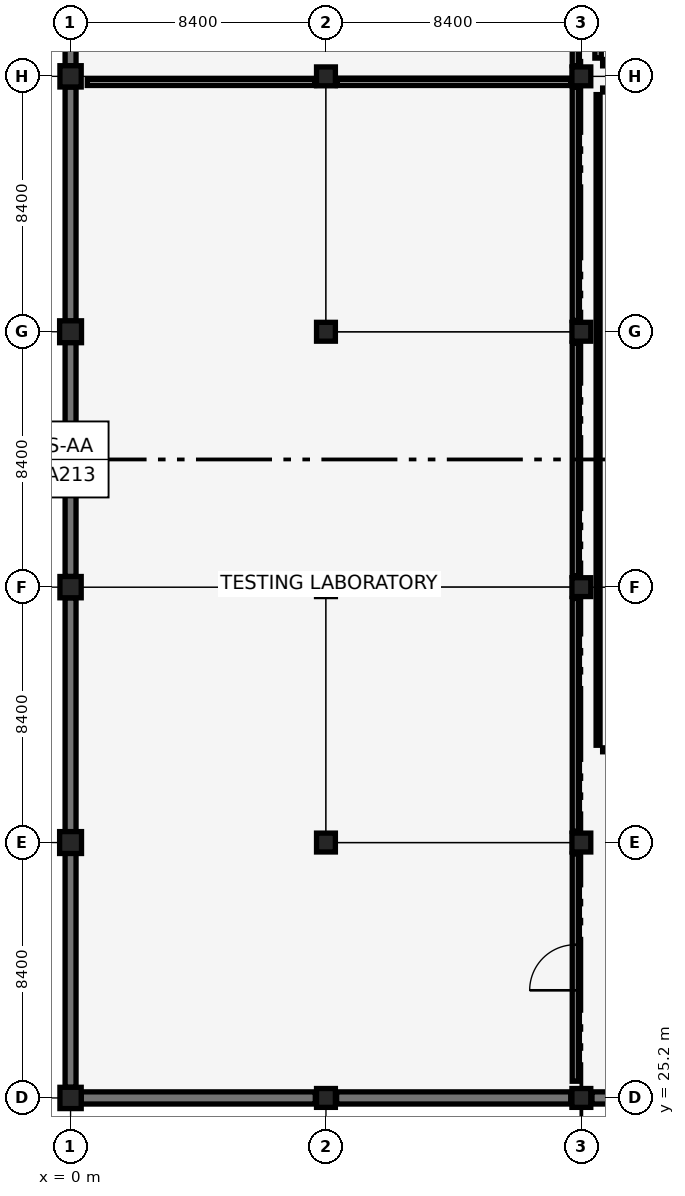
"""IFC4 building model, lengths in metres.
Left out: names, types, materials, properties, quantities, classifications, styles, units other than length and angle.
Written with IfcOpenShell. Run it as: python <this file> out.ifc"""

import sys

from ifc_helpers import new_model, si_unit, direction, frame, frame_2d, origin, origin_2d, place, context, subcontext, project, spatial, rectangle, extrude, element, fill, save


model = new_model("IFC4")
c1 = context("Model", 3, precision=1e-05, world=origin(), true_north=direction((0.0, 1.0)))
c2 = subcontext(c1, "Body", "Model", "MODEL_VIEW")
j1 = project(units=[si_unit("LENGTHUNIT", "METRE"), si_unit("PLANEANGLEUNIT", "RADIAN")], contexts=[c1])
p1 = place(None, origin())
s1 = spatial("IfcSite", under=j1, at=p1, CompositionType="ELEMENT")
p2 = place(p1, origin())
s2 = spatial("IfcBuilding", under=s1, at=p2, CompositionType="ELEMENT")
p3 = place(p2, frame((0.0, 0.0, -4.42)))
s3 = spatial("IfcBuildingStorey", under=s2, at=p3, CompositionType="ELEMENT", Elevation=-4.42)
p4 = place(p3, frame((0.35, 25.2, 0.0), z_axis=(0.0, 0.0, 1.0), x_axis=(1.0, 0.0, 0.0)))
e1 = element("IfcWall", 1, at=p4, inside=s3, PredefinedType="USERDEFINED", context=c2, shape_type="SweptSolid", body=[
    extrude(rectangle(XDim=7.7, YDim=0.4, at=frame_2d((3.85, 0.0))), origin(), (0.0, 0.0, 1.0), 4.12),
])
for number, where, z_axis, x_axis in (
    (2, (0.0, 25.55, 0.0), (0.0, 0.0, 1.0), (0.0, 1.0, 0.0)),
    (3, (0.0, 33.95, 0.0), (0.0, 0.0, 1.0), (0.0, 1.0, 0.0)),
    (4, (0.0, 42.35, 0.0), (0.0, 0.0, 1.0), (0.0, 1.0, 0.0)),
    (5, (0.0, 50.75, 0.0), (0.0, 0.0, 1.0), (0.0, 1.0, 0.0)),
):
    element("IfcWall", number, at=place(p3, frame(where, z_axis=z_axis, x_axis=x_axis)), inside=s3, PredefinedType="USERDEFINED", context=c2, shape_type="SweptSolid", body=[
        extrude(rectangle(XDim=7.7, YDim=0.36, at=frame_2d((3.85, 0.0))), origin(), (0.0, 0.0, 1.0), 4.12),
    ])
p5 = place(p3, frame((0.0, 59.15, 0.0), z_axis=(0.0, 0.0, 1.0), x_axis=(0.0, 1.0, 0.0)))
e6 = element("IfcWall", 6, at=p5, inside=s3, PredefinedType="USERDEFINED", context=c2, shape_type="SweptSolid", body=[
    extrude(rectangle(XDim=7.7, YDim=0.36, at=frame_2d((3.85, 0.0))), origin(), (0.0, 0.0, 1.0), 4.12),
])
p6 = place(p3, frame((8.75, 25.2, 0.0), z_axis=(0.0, 0.0, 1.0), x_axis=(1.0, 0.0, 0.0)))
e7 = element("IfcWall", 7, at=p6, inside=s3, PredefinedType="USERDEFINED", context=c2, shape_type="SweptSolid", body=[
    extrude(rectangle(XDim=7.7, YDim=0.4, at=frame_2d((3.85, 0.0))), origin(), (0.0, 0.0, 1.0), 4.12),
])
p7 = place(p3, frame((17.15, 25.2, 0.0), z_axis=(0.0, 0.0, 1.0), x_axis=(1.0, 0.0, 0.0)))
e8 = element("IfcWall", 8, at=p7, inside=s3, PredefinedType="USERDEFINED", context=c2, shape_type="SweptSolid", body=[
    extrude(rectangle(XDim=7.7, YDim=0.4, at=frame_2d((3.85, 0.0))), origin(), (0.0, 0.0, 1.0), 4.12),
])
p8 = place(p3, frame((0.0, 25.2, -0.4), z_axis=(0.0, 0.0, 1.0), x_axis=(1.0, 0.0, 0.0)))
e9 = element("IfcColumn", 9, at=p8, inside=s3, PredefinedType="COLUMN", context=c2, shape_type="SweptSolid", body=[
    extrude(rectangle(XDim=0.7, YDim=0.7, at=origin_2d()), origin(), (0.0, 0.0, 1.0), 4.52),
])
p9 = place(p3, frame((0.0, 33.6, -0.4), z_axis=(0.0, 0.0, 1.0), x_axis=(1.0, 0.0, 0.0)))
e10 = element("IfcColumn", 10, at=p9, inside=s3, PredefinedType="COLUMN", context=c2, shape_type="SweptSolid", body=[
    extrude(rectangle(XDim=0.72, YDim=0.72, at=origin_2d()), origin(), (0.0, 0.0, 1.0), 4.52),
])
p10 = place(p3, frame((0.0, 42.0, -0.4), z_axis=(0.0, 0.0, 1.0), x_axis=(1.0, 0.0, 0.0)))
e11 = element("IfcColumn", 11, at=p10, inside=s3, PredefinedType="COLUMN", context=c2, shape_type="SweptSolid", body=[
    extrude(rectangle(XDim=0.7, YDim=0.7, at=origin_2d()), origin(), (0.0, 0.0, 1.0), 4.52),
])
p11 = place(p3, frame((0.0, 50.4, -0.4), z_axis=(0.0, 0.0, 1.0), x_axis=(1.0, 0.0, 0.0)))
e12 = element("IfcColumn", 12, at=p11, inside=s3, PredefinedType="COLUMN", context=c2, shape_type="SweptSolid", body=[
    extrude(rectangle(XDim=0.72, YDim=0.72, at=origin_2d()), origin(), (0.0, 0.0, 1.0), 4.52),
])
p12 = place(p3, frame((0.0, 58.8, -0.4), z_axis=(0.0, 0.0, 1.0), x_axis=(1.0, 0.0, 0.0)))
e13 = element("IfcColumn", 13, at=p12, inside=s3, PredefinedType="COLUMN", context=c2, shape_type="SweptSolid", body=[
    extrude(rectangle(XDim=0.7, YDim=0.7, at=origin_2d()), origin(), (0.0, 0.0, 1.0), 4.52),
])
for number, where, z_axis, x_axis in (
    (14, (8.4, 25.2, -0.4), (0.0, 0.0, 1.0), (1.0, 0.0, 0.0)),
    (15, (8.4, 33.6, -0.4), (0.0, 0.0, 1.0), (1.0, 0.0, 0.0)),
    (16, (8.4, 42.0, -0.4), (0.0, 0.0, 1.0), (1.0, 0.0, 0.0)),
    (17, (8.4, 50.4, -0.4), (0.0, 0.0, 1.0), (1.0, 0.0, 0.0)),
    (18, (8.4, 58.8, -0.4), (0.0, 0.0, 1.0), (1.0, 0.0, 0.0)),
    (19, (16.8, 25.2, -0.4), (0.0, 0.0, 1.0), (1.0, 0.0, 0.0)),
    (20, (16.8, 33.6, -0.4), (0.0, 0.0, 1.0), (1.0, 0.0, 0.0)),
    (21, (16.8, 42.0, -0.4), (0.0, 0.0, 1.0), (1.0, 0.0, 0.0)),
    (22, (16.8, 50.4, -0.4), (0.0, 0.0, 1.0), (1.0, 0.0, 0.0)),
    (23, (16.8, 58.8, -0.4), (0.0, 0.0, 1.0), (1.0, 0.0, 0.0)),
):
    element("IfcColumn", number, at=place(p3, frame(where, z_axis=z_axis, x_axis=x_axis)), inside=s3, PredefinedType="COLUMN", context=c2, shape_type="SweptSolid", body=[
        extrude(rectangle(XDim=0.62, YDim=0.62, at=origin_2d()), origin(), (0.0, 0.0, 1.0), 4.52),
    ])
p13 = place(p3, frame((16.6, 25.75, 0.0), z_axis=(0.0, 0.0, 1.0), x_axis=(0.0, 1.0, 0.0)))
e24 = element("IfcWall", 24, at=p13, inside=s3, PredefinedType="PARTITIONING", context=c2, shape_type="SweptSolid", body=[
    extrude(rectangle(XDim=7.48, YDim=0.2, at=frame_2d((3.74, 0.0))), origin(), (0.0, 0.0, 1.0), 3.2),
])
p14 = place(p13, frame((2.99, 0.0, 0.0)))
e25 = element("IfcOpeningElement", 25, at=p14, cuts=e24, PredefinedType="OPENING", context=c2, shape_type="SweptSolid", body=[
    extrude(rectangle(XDim=1.5, YDim=2.2, at=frame_2d((0.75, 1.1))), frame((0.0, 0.11, 0.0), z_axis=(0.0, -1.0, 0.0), x_axis=(1.0, 0.0, 0.0)), (0.0, 0.0, 1.0), 0.22),
])
for number, where, z_axis, x_axis in (
    (26, (16.6, 33.97, 0.0), (0.0, 0.0, 1.0), (0.0, 1.0, 0.0)),
    (27, (16.6, 42.37, 0.0), (0.0, 0.0, 1.0), (0.0, 1.0, 0.0)),
):
    element("IfcWall", number, at=place(p3, frame(where, z_axis=z_axis, x_axis=x_axis)), inside=s3, PredefinedType="PARTITIONING", context=c2, shape_type="SweptSolid", body=[
        extrude(rectangle(XDim=7.66, YDim=0.2, at=frame_2d((3.83, 0.0))), origin(), (0.0, 0.0, 1.0), 3.2),
    ])
p15 = place(p3, frame((16.6, 50.77, 0.0), z_axis=(0.0, 0.0, 1.0), x_axis=(0.0, 1.0, 0.0)))
e28 = element("IfcWall", 28, at=p15, inside=s3, PredefinedType="PARTITIONING", context=c2, shape_type="SweptSolid", body=[
    extrude(rectangle(XDim=7.68, YDim=0.2, at=frame_2d((3.84, 0.0))), origin(), (0.0, 0.0, 1.0), 3.2),
])
p16 = place(p3, frame((0.55, 58.6, 0.0), z_axis=(0.0, 0.0, 1.0), x_axis=(1.0, 0.0, 0.0)))
e29 = element("IfcWall", 29, at=p16, inside=s3, PredefinedType="PARTITIONING", context=c2, shape_type="SweptSolid", body=[
    extrude(rectangle(XDim=7.48, YDim=0.2, at=frame_2d((3.74, 0.0))), origin(), (0.0, 0.0, 1.0), 3.2),
])
p17 = place(p3, frame((8.77, 58.6, 0.0), z_axis=(0.0, 0.0, 1.0), x_axis=(1.0, 0.0, 0.0)))
e30 = element("IfcWall", 30, at=p17, inside=s3, PredefinedType="PARTITIONING", context=c2, shape_type="SweptSolid", body=[
    extrude(rectangle(XDim=7.68, YDim=0.2, at=frame_2d((3.84, 0.0))), origin(), (0.0, 0.0, 1.0), 3.2),
])
p18 = place(p3, frame((16.6, 59.15, 0.0), z_axis=(0.0, 0.0, 1.0), x_axis=(0.0, 1.0, 0.0)))
e31 = element("IfcWall", 31, at=p18, inside=s3, PredefinedType="PARTITIONING", context=c2, shape_type="SweptSolid", body=[
    extrude(rectangle(XDim=7.68, YDim=0.2, at=frame_2d((3.84, 0.0))), origin(), (0.0, 0.0, 1.0), 3.2),
])
p19 = place(p3, frame((17.5, 36.65, 0.0), z_axis=(0.0, 0.0, 1.0), x_axis=(1.0, 0.0, 0.0)))
e32 = element("IfcWall", 32, at=p19, inside=s3, PredefinedType="PARTITIONING", context=c2, shape_type="SweptSolid", body=[
    extrude(rectangle(XDim=7.0, YDim=0.13, at=frame_2d((3.5, 0.0))), origin(), (0.0, 0.0, 1.0), 4.12),
])
p20 = place(p19, frame((3.05, 0.0, 0.0)))
e33 = element("IfcOpeningElement", 33, at=p20, cuts=e32, PredefinedType="OPENING", context=c2, shape_type="SweptSolid", body=[
    extrude(rectangle(XDim=0.9, YDim=2.1, at=frame_2d((0.45, 1.05))), frame((0.0, 0.075, 0.0), z_axis=(0.0, -1.0, 0.0), x_axis=(1.0, 0.0, 0.0)), (0.0, 0.0, 1.0), 0.15),
])
p21 = place(p3, frame((17.5, 58.35, 0.0), z_axis=(0.0, 0.0, 1.0), x_axis=(1.0, 0.0, 0.0)))
e34 = element("IfcWall", 34, at=p21, inside=s3, PredefinedType="PARTITIONING", context=c2, shape_type="SweptSolid", body=[
    extrude(rectangle(XDim=7.0, YDim=0.13, at=frame_2d((3.5, 0.0))), origin(), (0.0, 0.0, 1.0), 4.12),
])
p22 = place(p3, frame((17.35, 36.8, 0.0), z_axis=(0.0, 0.0, 1.0), x_axis=(0.0, 1.0, 0.0)))
e35 = element("IfcWall", 35, at=p22, inside=s3, PredefinedType="PARTITIONING", context=c2, shape_type="SweptSolid", body=[
    extrude(rectangle(XDim=21.4, YDim=0.13, at=frame_2d((10.7, 0.0))), origin(), (0.0, 0.0, 1.0), 3.2),
])
p23 = place(p3, frame((17.5, 59.25, 0.0), z_axis=(0.0, 0.0, 1.0), x_axis=(1.0, 0.0, 0.0)))
e36 = element("IfcWall", 36, at=p23, inside=s3, PredefinedType="PARTITIONING", context=c2, shape_type="SweptSolid", body=[
    extrude(rectangle(XDim=7.0, YDim=0.21, at=frame_2d((3.5, 0.0))), origin(), (0.0, 0.0, 1.0), 4.12),
])
p24 = place(p3, frame((17.35, 59.4, 0.0), z_axis=(0.0, 0.0, 1.0), x_axis=(0.0, 1.0, 0.0)))
e37 = element("IfcWall", 37, at=p24, inside=s3, PredefinedType="PARTITIONING", context=c2, shape_type="SweptSolid", body=[
    extrude(rectangle(XDim=21.3, YDim=0.21, at=frame_2d((10.65, 0.0))), origin(), (0.0, 0.0, 1.0), 3.2),
])
p25 = place(p14, origin())
e38 = element("IfcDoor", 38, at=p25, inside=s3, OperationType="DOUBLE_DOOR_SINGLE_SWING", PredefinedType="DOOR", context=c2, shape_type="SweptSolid", body=[
    extrude(rectangle(XDim=1.5, YDim=2.2, at=frame_2d((0.75, 1.1))), frame((0.0, 0.025, 0.0), z_axis=(0.0, -1.0, 0.0), x_axis=(1.0, 0.0, 0.0)), (0.0, 0.0, 1.0), 0.05),
])
fill(e25, e38)
save(model, sys.argv[1])
